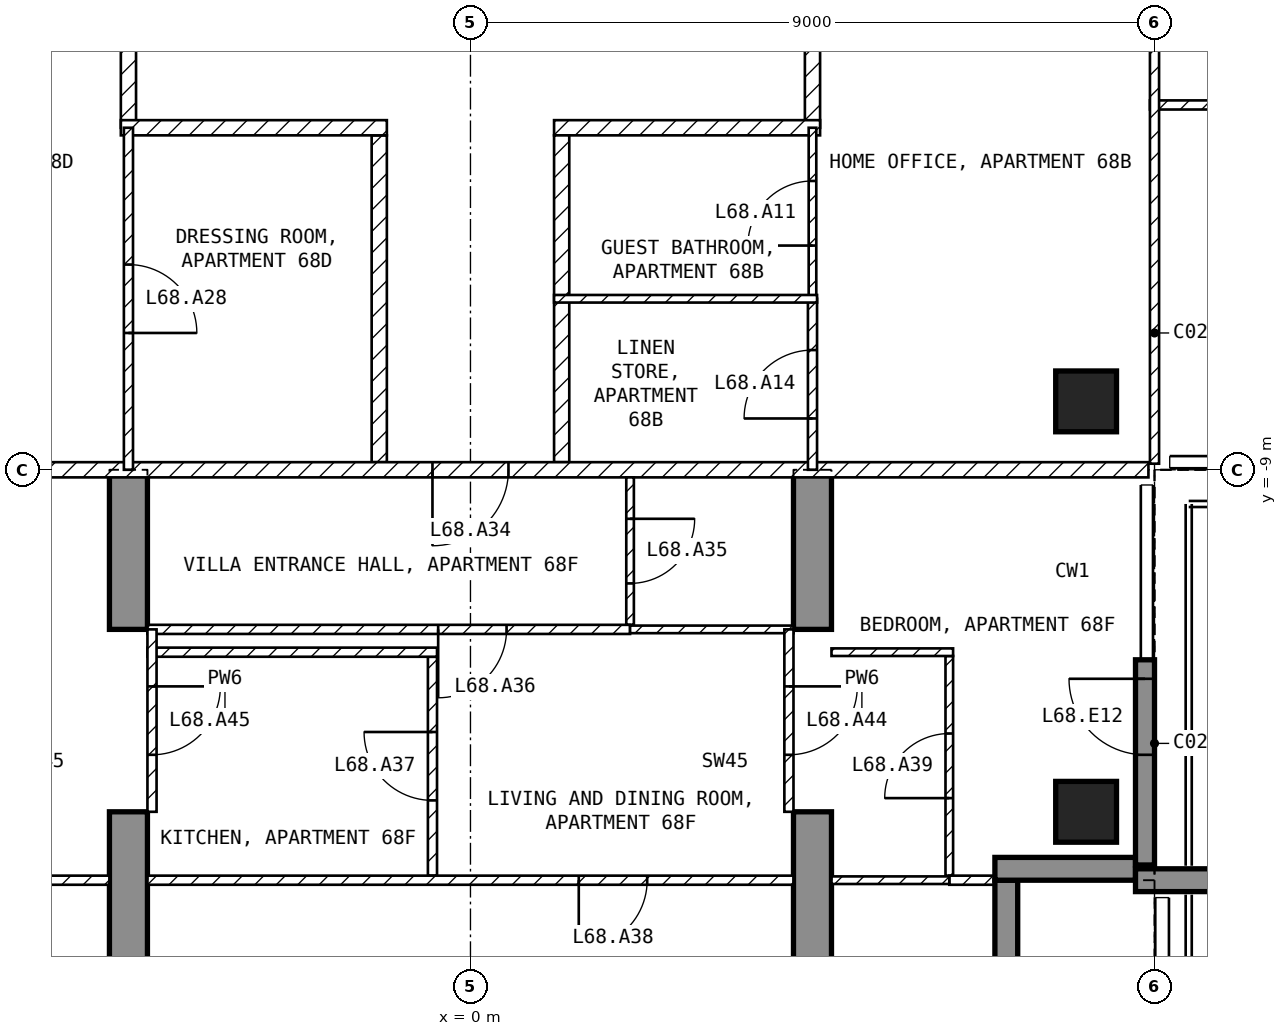
"""IFC4 building model, lengths in metres.
Left out: names, types, materials, properties, quantities, classifications, styles, units other than length and angle.
Written with IfcOpenShell. Run it as: python <this file> out.ifc"""

import sys

from ifc_helpers import new_model, si_unit, direction, frame, frame_2d, origin, origin_2d, place, context, subcontext, project, spatial, polyline, rectangle, outline, extrude, element, fill, save


model = new_model("IFC4")
c1 = context("Model", 3, precision=1e-05, world=origin(), true_north=direction((0.0, 1.0)))
c2 = subcontext(c1, "Body", "Model", "MODEL_VIEW")
j1 = project(units=[si_unit("LENGTHUNIT", "METRE"), si_unit("PLANEANGLEUNIT", "RADIAN")], contexts=[c1])
p1 = place(None, origin())
s1 = spatial("IfcSite", under=j1, at=p1, CompositionType="ELEMENT")
p2 = place(p1, origin())
s2 = spatial("IfcBuilding", under=s1, at=p2, CompositionType="ELEMENT")
p3 = place(p2, frame((0.0, 0.0, 267.5)))
s3 = spatial("IfcBuildingStorey", under=s2, at=p3, CompositionType="ELEMENT", Elevation=267.5)
for number, where, z_axis, x_axis in (
    (1, (8.1, -13.5, -0.25), (0.0, 0.0, 1.0), (1.0, 0.0, 0.0)),
    (2, (8.1, -8.1, -0.25), (0.0, 0.0, 1.0), (1.0, 0.0, 0.0)),
):
    element("IfcColumn", number, at=place(p3, frame(where, z_axis=z_axis, x_axis=x_axis)), inside=s3, PredefinedType="COLUMN", context=c2, shape_type="SweptSolid", body=[
        extrude(rectangle(XDim=0.8, YDim=0.8, at=origin_2d()), origin(), (0.0, 0.0, 1.0), 3.5),
    ])
for number, where, z_axis, x_axis in (
    (3, (-4.75, -16.7, -0.25), (1.0, 0.0, 0.0), (0.0, 1.0, 0.0)),
    (4, (4.25, -16.7, -0.25), (1.0, 0.0, 0.0), (0.0, 1.0, 0.0)),
):
    element("IfcWall", number, at=place(p3, frame(where, z_axis=z_axis, x_axis=x_axis)), inside=s3, PredefinedType="SHEAR", context=c2, shape_type="SweptSolid", body=[
        extrude(outline(polyline([(0.0, 0.0), (3.2, 0.0), (3.2, 2.65), (5.6, 2.65), (5.6, 0.0), (7.7, 0.0), (7.7, 3.5), (0.0, 3.5), (0.0, 0.0)])), origin(), (0.0, 0.0, 1.0), 0.5),
    ])
p4 = place(p3, frame((8.875, -14.2, 0.0), z_axis=(0.0, 0.0, 1.0), x_axis=(0.0, 1.0, 0.0)))
e5 = element("IfcWall", 5, at=p4, inside=s3, PredefinedType="SOLIDWALL", context=c2, shape_type="SweptSolid", body=[
    extrude(rectangle(XDim=2.7, YDim=0.25, at=frame_2d((1.35, 0.0))), origin(), (0.0, 0.0, 1.0), 3.25),
])
p5 = place(p4, frame((1.45, 0.0, 0.0)))
e6 = element("IfcOpeningElement", 6, at=p5, cuts=e5, PredefinedType="OPENING", context=c2, shape_type="SweptSolid", body=[
    extrude(rectangle(XDim=1.0, YDim=2.4, at=frame_2d((0.5, 1.2))), frame((0.0, 0.135, 0.0), z_axis=(0.0, -1.0, 0.0), x_axis=(1.0, 0.0, 0.0)), (0.0, 0.0, 1.0), 0.27),
])
p6 = place(p3, frame((7.05, -16.2, 0.0), z_axis=(0.0, 0.0, 1.0), x_axis=(0.0, 1.0, 0.0)))
e7 = element("IfcWall", 7, at=p6, inside=s3, PredefinedType="SOLIDWALL", context=c2, shape_type="SweptSolid", body=[
    extrude(rectangle(XDim=1.8, YDim=0.3, at=frame_2d((0.9, 0.0))), origin(), (0.0, 0.0, 1.0), 3.25),
])
p7 = place(p3, frame((6.9, -14.25, 0.0), z_axis=(0.0, 0.0, 1.0), x_axis=(1.0, 0.0, 0.0)))
e8 = element("IfcWall", 8, at=p7, inside=s3, PredefinedType="SOLIDWALL", context=c2, shape_type="SweptSolid", body=[
    extrude(rectangle(XDim=1.85, YDim=0.3, at=frame_2d((0.925, 0.0))), origin(), (0.0, 0.0, 1.0), 3.25),
])
p8 = place(p3, frame((8.75, -14.4, 0.0), z_axis=(0.0, 0.0, 1.0), x_axis=(1.0, 0.0, 0.0)))
e9 = element("IfcWall", 9, at=p8, inside=s3, PredefinedType="SOLIDWALL", context=c2, shape_type="SweptSolid", body=[
    extrude(rectangle(XDim=2.95, YDim=0.3, at=frame_2d((1.475, 0.0))), origin(), (0.0, 0.0, 1.0), 3.25),
])
p9 = place(p3, frame((4.5, -1.3, 0.0), z_axis=(0.0, 0.0, 1.0), x_axis=(0.0, -1.0, 0.0)))
e10 = element("IfcWall", 10, at=p9, inside=s3, PredefinedType="PARTITIONING", context=c2, shape_type="SweptSolid", body=[
    extrude(rectangle(XDim=3.2, YDim=0.2, at=frame_2d((1.6, 0.0))), origin(), (0.0, 0.0, 1.0), 3.25),
])
p10 = place(p3, frame((4.6, -4.5, 0.0), z_axis=(0.0, 0.0, 1.0), x_axis=(-1.0, 0.0, 0.0)))
e11 = element("IfcWall", 11, at=p10, inside=s3, PredefinedType="PARTITIONING", context=c2, shape_type="SweptSolid", body=[
    extrude(rectangle(XDim=3.5, YDim=0.2, at=frame_2d((1.75, 0.0))), origin(), (0.0, 0.0, 1.0), 3.25),
])
p11 = place(p3, frame((1.2, -4.6, 0.0), z_axis=(0.0, 0.0, 1.0), x_axis=(0.0, -1.0, 0.0)))
e12 = element("IfcWall", 12, at=p11, inside=s3, PredefinedType="PARTITIONING", context=c2, shape_type="SweptSolid", body=[
    extrude(rectangle(XDim=4.3, YDim=0.2, at=frame_2d((2.15, 0.0))), origin(), (0.0, 0.0, 1.0), 3.25),
])
p12 = place(p3, frame((-4.5, -4.5, 0.0), z_axis=(0.0, 0.0, 1.0), x_axis=(0.0, 1.0, 0.0)))
e13 = element("IfcWall", 13, at=p12, inside=s3, PredefinedType="PARTITIONING", context=c2, shape_type="SweptSolid", body=[
    extrude(rectangle(XDim=3.2, YDim=0.2, at=frame_2d((1.6, 0.0))), origin(), (0.0, 0.0, 1.0), 3.25),
])
p13 = place(p3, frame((-1.2, -8.9, 0.0), z_axis=(0.0, 0.0, 1.0), x_axis=(0.0, 1.0, 0.0)))
e14 = element("IfcWall", 14, at=p13, inside=s3, PredefinedType="PARTITIONING", context=c2, shape_type="SweptSolid", body=[
    extrude(rectangle(XDim=4.3, YDim=0.2, at=frame_2d((2.15, 0.0))), origin(), (0.0, 0.0, 1.0), 3.25),
])
p14 = place(p3, frame((-1.1, -4.5, 0.0), z_axis=(0.0, 0.0, 1.0), x_axis=(-1.0, 0.0, 0.0)))
e15 = element("IfcWall", 15, at=p14, inside=s3, PredefinedType="PARTITIONING", context=c2, shape_type="SweptSolid", body=[
    extrude(rectangle(XDim=3.5, YDim=0.2, at=frame_2d((1.75, 0.0))), origin(), (0.0, 0.0, 1.0), 3.25),
])
p15 = place(p3, frame((8.92, -9.0, 0.0), z_axis=(0.0, 0.0, 1.0), x_axis=(-1.0, 0.0, 0.0)))
e16 = element("IfcWall", 16, at=p15, inside=s3, PredefinedType="PARTITIONING", context=c2, shape_type="SweptSolid", body=[
    extrude(rectangle(XDim=17.84, YDim=0.2, at=frame_2d((8.92, 0.0))), origin(), (0.0, 0.0, 1.0), 3.25),
])
p16 = place(p15, frame((8.42, 0.0, 0.0)))
e17 = element("IfcOpeningElement", 17, at=p16, cuts=e16, PredefinedType="OPENING", context=c2, shape_type="SweptSolid", body=[
    extrude(rectangle(XDim=1.0, YDim=2.1, at=frame_2d((0.5, 1.05))), frame((0.0, 0.11, 0.0), z_axis=(0.0, -1.0, 0.0), x_axis=(1.0, 0.0, 0.0)), (0.0, 0.0, 1.0), 0.22),
])
p17 = place(p3, frame((15.6, -4.2, 0.0), z_axis=(0.0, 0.0, 1.0), x_axis=(-1.0, 0.0, 0.0)))
e18 = element("IfcWall", 18, at=p17, inside=s3, PredefinedType="PARTITIONING", context=c2, shape_type="SweptSolid", body=[
    extrude(rectangle(XDim=6.66, YDim=0.12, at=frame_2d((3.33, 0.0))), origin(), (0.0, 0.0, 1.0), 3.25),
])
p18 = place(p17, frame((4.5, 0.0, 0.0)))
e19 = element("IfcOpeningElement", 19, at=p18, cuts=e18, PredefinedType="OPENING", context=c2, shape_type="SweptSolid", body=[
    extrude(rectangle(XDim=0.9, YDim=2.1, at=frame_2d((0.45, 1.05))), frame((0.0, 0.07, 0.0), z_axis=(0.0, -1.0, 0.0), x_axis=(1.0, 0.0, 0.0)), (0.0, 0.0, 1.0), 0.14),
])
p19 = place(p3, frame((9.0, -8.92, 0.0), z_axis=(0.0, 0.0, 1.0), x_axis=(0.0, 1.0, 0.0)))
e20 = element("IfcWall", 20, at=p19, inside=s3, PredefinedType="PARTITIONING", context=c2, shape_type="SweptSolid", body=[
    extrude(rectangle(XDim=7.62, YDim=0.12, at=frame_2d((3.81, 0.0))), origin(), (0.0, 0.0, 1.0), 3.25),
])
p20 = place(p19, frame((5.72, 0.0, 0.0)))
e21 = element("IfcOpeningElement", 21, at=p20, cuts=e20, PredefinedType="OPENING", context=c2, shape_type="SweptSolid", body=[
    extrude(rectangle(XDim=0.9, YDim=2.1, at=frame_2d((0.45, 1.05))), frame((0.0, 0.07, 0.0), z_axis=(0.0, -1.0, 0.0), x_axis=(1.0, 0.0, 0.0)), (0.0, 0.0, 1.0), 0.14),
])
p21 = place(p3, frame((4.5, -6.75, 0.0), z_axis=(0.0, 0.0, 1.0), x_axis=(0.0, 1.0, 0.0)))
e22 = element("IfcWall", 22, at=p21, inside=s3, PredefinedType="PARTITIONING", context=c2, shape_type="SweptSolid", body=[
    extrude(rectangle(XDim=2.25, YDim=0.1, at=frame_2d((1.125, 0.0))), origin(), (0.0, 0.0, 1.0), 3.25),
])
p22 = place(p21, frame((0.7, 0.0, 0.0)))
e23 = element("IfcOpeningElement", 23, at=p22, cuts=e22, PredefinedType="OPENING", context=c2, shape_type="SweptSolid", body=[
    extrude(rectangle(XDim=0.85, YDim=2.1, at=frame_2d((0.425, 1.05))), frame((0.0, 0.06, 0.0), z_axis=(0.0, -1.0, 0.0), x_axis=(1.0, 0.0, 0.0)), (0.0, 0.0, 1.0), 0.12),
])
p23 = place(p3, frame((4.5, -9.0, 0.0), z_axis=(0.0, 0.0, 1.0), x_axis=(0.0, 1.0, 0.0)))
e24 = element("IfcWall", 24, at=p23, inside=s3, PredefinedType="PARTITIONING", context=c2, shape_type="SweptSolid", body=[
    extrude(rectangle(XDim=2.25, YDim=0.12, at=frame_2d((1.125, 0.0))), origin(), (0.0, 0.0, 1.0), 3.25),
])
p24 = place(p23, frame((0.675, 0.0, 0.0)))
e25 = element("IfcOpeningElement", 25, at=p24, cuts=e24, PredefinedType="OPENING", context=c2, shape_type="SweptSolid", body=[
    extrude(rectangle(XDim=0.9, YDim=2.1, at=frame_2d((0.45, 1.05))), frame((0.0, 0.07, 0.0), z_axis=(0.0, -1.0, 0.0), x_axis=(1.0, 0.0, 0.0)), (0.0, 0.0, 1.0), 0.14),
])
p25 = place(p3, frame((4.56, -6.75, 0.0), z_axis=(0.0, 0.0, 1.0), x_axis=(-1.0, 0.0, 0.0)))
e26 = element("IfcWall", 26, at=p25, inside=s3, PredefinedType="PARTITIONING", context=c2, shape_type="SweptSolid", body=[
    extrude(rectangle(XDim=3.46, YDim=0.1, at=frame_2d((1.73, 0.0))), origin(), (0.0, 0.0, 1.0), 3.25),
])
p26 = place(p3, frame((-4.5, -4.5, 0.0), z_axis=(0.0, 0.0, 1.0), x_axis=(0.0, -1.0, 0.0)))
e27 = element("IfcWall", 27, at=p26, inside=s3, PredefinedType="PARTITIONING", context=c2, shape_type="SweptSolid", body=[
    extrude(rectangle(XDim=4.5, YDim=0.12, at=frame_2d((2.25, 0.0))), origin(), (0.0, 0.0, 1.0), 3.25),
])
p27 = place(p26, frame((1.8, 0.0, 0.0)))
e28 = element("IfcOpeningElement", 28, at=p27, cuts=e27, PredefinedType="OPENING", context=c2, shape_type="SweptSolid", body=[
    extrude(rectangle(XDim=0.9, YDim=2.1, at=frame_2d((0.45, 1.05))), frame((0.0, 0.07, 0.0), z_axis=(0.0, -1.0, 0.0), x_axis=(1.0, 0.0, 0.0)), (0.0, 0.0, 1.0), 0.14),
])
p28 = place(p3, frame((2.1, -9.1, 0.0), z_axis=(0.0, 0.0, 1.0), x_axis=(0.0, -1.0, 0.0)))
e29 = element("IfcWall", 29, at=p28, inside=s3, PredefinedType="PARTITIONING", context=c2, shape_type="SweptSolid", body=[
    extrude(rectangle(XDim=1.94, YDim=0.1, at=frame_2d((0.97, 0.0))), origin(), (0.0, 0.0, 1.0), 3.25),
])
p29 = place(p28, frame((0.545, 0.0, 0.0)))
e30 = element("IfcOpeningElement", 30, at=p29, cuts=e29, PredefinedType="OPENING", context=c2, shape_type="SweptSolid", body=[
    extrude(rectangle(XDim=0.85, YDim=2.1, at=frame_2d((0.425, 1.05))), frame((0.0, 0.06, 0.0), z_axis=(0.0, -1.0, 0.0), x_axis=(1.0, 0.0, 0.0)), (0.0, 0.0, 1.0), 0.12),
])
p30 = place(p3, frame((2.1, -11.1, 0.0), z_axis=(0.0, 0.0, 1.0), x_axis=(-1.0, 0.0, 0.0)))
e31 = element("IfcWall", 31, at=p30, inside=s3, PredefinedType="PARTITIONING", context=c2, shape_type="SweptSolid", body=[
    extrude(rectangle(XDim=6.35, YDim=0.12, at=frame_2d((3.175, 0.0))), origin(), (0.0, 0.0, 1.0), 3.25),
])
p31 = place(p30, frame((1.625, 0.0, 0.0)))
e32 = element("IfcOpeningElement", 32, at=p31, cuts=e31, PredefinedType="OPENING", context=c2, shape_type="SweptSolid", body=[
    extrude(rectangle(XDim=0.9, YDim=2.1, at=frame_2d((0.45, 1.05))), frame((0.0, 0.07, 0.0), z_axis=(0.0, -1.0, 0.0), x_axis=(1.0, 0.0, 0.0)), (0.0, 0.0, 1.0), 0.14),
])
p32 = place(p3, frame((4.25, -11.1, 0.0), z_axis=(0.0, 0.0, 1.0), x_axis=(-1.0, 0.0, 0.0)))
e33 = element("IfcWall", 33, at=p32, inside=s3, PredefinedType="PARTITIONING", context=c2, shape_type="SweptSolid", body=[
    extrude(rectangle(XDim=2.15, YDim=0.1, at=frame_2d((1.075, 0.0))), origin(), (0.0, 0.0, 1.0), 3.25),
])
p33 = place(p3, frame((-0.5, -14.34, 0.0), z_axis=(0.0, 0.0, 1.0), x_axis=(0.0, 1.0, 0.0)))
e34 = element("IfcWall", 34, at=p33, inside=s3, PredefinedType="PARTITIONING", context=c2, shape_type="SweptSolid", body=[
    extrude(rectangle(XDim=2.88, YDim=0.12, at=frame_2d((1.44, 0.0))), origin(), (0.0, 0.0, 1.0), 3.25),
])
p34 = place(p33, frame((0.99, 0.0, 0.0)))
e35 = element("IfcOpeningElement", 35, at=p34, cuts=e34, PredefinedType="OPENING", context=c2, shape_type="SweptSolid", body=[
    extrude(rectangle(XDim=0.9, YDim=2.1, at=frame_2d((0.45, 1.05))), frame((0.0, 0.07, 0.0), z_axis=(0.0, -1.0, 0.0), x_axis=(1.0, 0.0, 0.0)), (0.0, 0.0, 1.0), 0.14),
])
p35 = place(p3, frame((-0.44, -11.4, 0.0), z_axis=(0.0, 0.0, 1.0), x_axis=(-1.0, 0.0, 0.0)))
e36 = element("IfcWall", 36, at=p35, inside=s3, PredefinedType="PARTITIONING", context=c2, shape_type="SweptSolid", body=[
    extrude(rectangle(XDim=3.81, YDim=0.12, at=frame_2d((1.905, 0.0))), origin(), (0.0, 0.0, 1.0), 3.25),
])
p36 = place(p3, frame((4.25, -14.4, 0.0), z_axis=(0.0, 0.0, 1.0), x_axis=(-1.0, 0.0, 0.0)))
e37 = element("IfcWall", 37, at=p36, inside=s3, PredefinedType="PARTITIONING", context=c2, shape_type="SweptSolid", body=[
    extrude(rectangle(XDim=8.5, YDim=0.12, at=frame_2d((4.25, 0.0))), origin(), (0.0, 0.0, 1.0), 3.25),
])
p37 = place(p36, frame((1.925, 0.0, 0.0)))
e38 = element("IfcOpeningElement", 38, at=p37, cuts=e37, PredefinedType="OPENING", context=c2, shape_type="SweptSolid", body=[
    extrude(rectangle(XDim=0.9, YDim=2.1, at=frame_2d((0.45, 1.05))), frame((0.0, 0.07, 0.0), z_axis=(0.0, -1.0, 0.0), x_axis=(1.0, 0.0, 0.0)), (0.0, 0.0, 1.0), 0.14),
])
p38 = place(p3, frame((6.3, -14.34, 0.0), z_axis=(0.0, 0.0, 1.0), x_axis=(0.0, 1.0, 0.0)))
e39 = element("IfcWall", 39, at=p38, inside=s3, PredefinedType="PARTITIONING", context=c2, shape_type="SweptSolid", body=[
    extrude(rectangle(XDim=2.89, YDim=0.1, at=frame_2d((1.445, 0.0))), origin(), (0.0, 0.0, 1.0), 3.25),
])
p39 = place(p38, frame((1.02, 0.0, 0.0)))
e40 = element("IfcOpeningElement", 40, at=p39, cuts=e39, PredefinedType="OPENING", context=c2, shape_type="SweptSolid", body=[
    extrude(rectangle(XDim=0.85, YDim=2.1, at=frame_2d((0.425, 1.05))), frame((0.0, 0.06, 0.0), z_axis=(0.0, -1.0, 0.0), x_axis=(1.0, 0.0, 0.0)), (0.0, 0.0, 1.0), 0.12),
])
p40 = place(p3, frame((6.35, -11.4, 0.0), z_axis=(0.0, 0.0, 1.0), x_axis=(-1.0, 0.0, 0.0)))
e41 = element("IfcWall", 41, at=p40, inside=s3, PredefinedType="PARTITIONING", context=c2, shape_type="SweptSolid", body=[
    extrude(rectangle(XDim=1.6, YDim=0.1, at=frame_2d((0.8, 0.0))), origin(), (0.0, 0.0, 1.0), 3.25),
])
p41 = place(p3, frame((7.12, -14.4, 0.0), z_axis=(0.0, 0.0, 1.0), x_axis=(-1.0, 0.0, 0.0)))
e42 = element("IfcWall", 42, at=p41, inside=s3, PredefinedType="PARTITIONING", context=c2, shape_type="SweptSolid", body=[
    extrude(rectangle(XDim=0.82, YDim=0.12, at=frame_2d((0.41, 0.0))), origin(), (0.0, 0.0, 1.0), 3.25),
])
p42 = place(p3, frame((6.3, -14.4, 0.0), z_axis=(0.0, 0.0, 1.0), x_axis=(-1.0, 0.0, 0.0)))
e43 = element("IfcWall", 43, at=p42, inside=s3, PredefinedType="PARTITIONING", context=c2, shape_type="SweptSolid", body=[
    extrude(rectangle(XDim=1.55, YDim=0.1, at=frame_2d((0.775, 0.0))), origin(), (0.0, 0.0, 1.0), 3.25),
])
p43 = place(p3, frame((-4.75, -14.4, 0.0), z_axis=(0.0, 0.0, 1.0), x_axis=(-1.0, 0.0, 0.0)))
e44 = element("IfcWall", 44, at=p43, inside=s3, PredefinedType="PARTITIONING", context=c2, shape_type="SweptSolid", body=[
    extrude(rectangle(XDim=2.37, YDim=0.12, at=frame_2d((1.185, 0.0))), origin(), (0.0, 0.0, 1.0), 3.25),
])
p44 = place(p3, frame((4.19, -11.1, 0.0), z_axis=(0.0, 0.0, 1.0), x_axis=(0.0, -1.0, 0.0)))
e45 = element("IfcWall", 45, at=p44, inside=s3, PredefinedType="PARTITIONING", context=c2, shape_type="SweptSolid", body=[
    extrude(rectangle(XDim=2.4, YDim=0.12, at=frame_2d((1.2, 0.0))), origin(), (0.0, 0.0, 1.0), 2.4),
])
p45 = place(p44, frame((0.75, 0.0, 0.0)))
e46 = element("IfcOpeningElement", 46, at=p45, cuts=e45, PredefinedType="OPENING", context=c2, shape_type="SweptSolid", body=[
    extrude(rectangle(XDim=0.9, YDim=2.1, at=frame_2d((0.45, 1.05))), frame((0.0, 0.07, 0.0), z_axis=(0.0, -1.0, 0.0), x_axis=(1.0, 0.0, 0.0)), (0.0, 0.0, 1.0), 0.14),
])
p46 = place(p3, frame((-4.19, -11.1, 0.0), z_axis=(0.0, 0.0, 1.0), x_axis=(0.0, -1.0, 0.0)))
e47 = element("IfcWall", 47, at=p46, inside=s3, PredefinedType="PARTITIONING", context=c2, shape_type="SweptSolid", body=[
    extrude(rectangle(XDim=2.4, YDim=0.12, at=frame_2d((1.2, 0.0))), origin(), (0.0, 0.0, 1.0), 2.4),
])
p47 = place(p46, frame((0.75, 0.0, 0.0)))
e48 = element("IfcOpeningElement", 48, at=p47, cuts=e47, PredefinedType="OPENING", context=c2, shape_type="SweptSolid", body=[
    extrude(rectangle(XDim=0.9, YDim=2.1, at=frame_2d((0.45, 1.05))), frame((0.0, 0.07, 0.0), z_axis=(0.0, -1.0, 0.0), x_axis=(1.0, 0.0, 0.0)), (0.0, 0.0, 1.0), 0.14),
])
p48 = place(p5, origin())
e49 = element("IfcDoor", 49, at=p48, inside=s3, OperationType="SINGLE_SWING_RIGHT", PredefinedType="DOOR", context=c2, shape_type="SweptSolid", body=[
    extrude(rectangle(XDim=1.0, YDim=2.4, at=frame_2d((0.5, 1.2))), frame((0.0, 0.025, 0.0), z_axis=(0.0, -1.0, 0.0), x_axis=(1.0, 0.0, 0.0)), (0.0, 0.0, 1.0), 0.05),
])
fill(e6, e49)
p49 = place(p22, origin())
e50 = element("IfcDoor", 50, at=p49, inside=s3, OperationType="SINGLE_SWING_LEFT", PredefinedType="DOOR", context=c2, shape_type="SweptSolid", body=[
    extrude(rectangle(XDim=0.85, YDim=2.1, at=frame_2d((0.425, 1.05))), frame((0.0, 0.025, 0.0), z_axis=(0.0, -1.0, 0.0), x_axis=(1.0, 0.0, 0.0)), (0.0, 0.0, 1.0), 0.05),
])
fill(e23, e50)
p50 = place(p24, origin())
e51 = element("IfcDoor", 51, at=p50, inside=s3, OperationType="SINGLE_SWING_LEFT", PredefinedType="DOOR", context=c2, shape_type="SweptSolid", body=[
    extrude(rectangle(XDim=0.9, YDim=2.1, at=frame_2d((0.45, 1.05))), frame((0.0, 0.025, 0.0), z_axis=(0.0, -1.0, 0.0), x_axis=(1.0, 0.0, 0.0)), (0.0, 0.0, 1.0), 0.05),
])
fill(e25, e51)
p51 = place(p27, origin())
e52 = element("IfcDoor", 52, at=p51, inside=s3, OperationType="SINGLE_SWING_RIGHT", PredefinedType="DOOR", context=c2, shape_type="SweptSolid", body=[
    extrude(rectangle(XDim=0.9, YDim=2.1, at=frame_2d((0.45, 1.05))), frame((0.0, 0.025, 0.0), z_axis=(0.0, -1.0, 0.0), x_axis=(1.0, 0.0, 0.0)), (0.0, 0.0, 1.0), 0.05),
])
fill(e28, e52)
p52 = place(p16, origin())
e53 = element("IfcDoor", 53, at=p52, inside=s3, OperationType="SINGLE_SWING_RIGHT", PredefinedType="DOOR", context=c2, shape_type="SweptSolid", body=[
    extrude(rectangle(XDim=1.0, YDim=2.1, at=frame_2d((0.5, 1.05))), frame((0.0, 0.025, 0.0), z_axis=(0.0, -1.0, 0.0), x_axis=(1.0, 0.0, 0.0)), (0.0, 0.0, 1.0), 0.05),
])
fill(e17, e53)
p53 = place(p29, origin())
e54 = element("IfcDoor", 54, at=p53, inside=s3, OperationType="SINGLE_SWING_LEFT", PredefinedType="DOOR", context=c2, shape_type="SweptSolid", body=[
    extrude(rectangle(XDim=0.85, YDim=2.1, at=frame_2d((0.425, 1.05))), frame((0.0, 0.025, 0.0), z_axis=(0.0, -1.0, 0.0), x_axis=(1.0, 0.0, 0.0)), (0.0, 0.0, 1.0), 0.05),
])
fill(e30, e54)
p54 = place(p31, origin())
e55 = element("IfcDoor", 55, at=p54, inside=s3, OperationType="SINGLE_SWING_RIGHT", PredefinedType="DOOR", context=c2, shape_type="SweptSolid", body=[
    extrude(rectangle(XDim=0.9, YDim=2.1, at=frame_2d((0.45, 1.05))), frame((0.0, 0.025, 0.0), z_axis=(0.0, -1.0, 0.0), x_axis=(1.0, 0.0, 0.0)), (0.0, 0.0, 1.0), 0.05),
])
fill(e32, e55)
p55 = place(p34, origin())
e56 = element("IfcDoor", 56, at=p55, inside=s3, OperationType="SINGLE_SWING_RIGHT", PredefinedType="DOOR", context=c2, shape_type="SweptSolid", body=[
    extrude(rectangle(XDim=0.9, YDim=2.1, at=frame_2d((0.45, 1.05))), frame((0.0, 0.025, 0.0), z_axis=(0.0, -1.0, 0.0), x_axis=(1.0, 0.0, 0.0)), (0.0, 0.0, 1.0), 0.05),
])
fill(e35, e56)
p56 = place(p37, origin())
e57 = element("IfcDoor", 57, at=p56, inside=s3, OperationType="SINGLE_SWING_RIGHT", PredefinedType="DOOR", context=c2, shape_type="SweptSolid", body=[
    extrude(rectangle(XDim=0.9, YDim=2.1, at=frame_2d((0.45, 1.05))), frame((0.0, 0.025, 0.0), z_axis=(0.0, -1.0, 0.0), x_axis=(1.0, 0.0, 0.0)), (0.0, 0.0, 1.0), 0.05),
])
fill(e38, e57)
p57 = place(p39, origin())
e58 = element("IfcDoor", 58, at=p57, inside=s3, OperationType="SINGLE_SWING_LEFT", PredefinedType="DOOR", context=c2, shape_type="SweptSolid", body=[
    extrude(rectangle(XDim=0.85, YDim=2.1, at=frame_2d((0.425, 1.05))), frame((0.0, 0.025, 0.0), z_axis=(0.0, -1.0, 0.0), x_axis=(1.0, 0.0, 0.0)), (0.0, 0.0, 1.0), 0.05),
])
fill(e40, e58)
p58 = place(p45, origin())
e59 = element("IfcDoor", 59, at=p58, inside=s3, OperationType="SINGLE_SWING_LEFT", PredefinedType="DOOR", context=c2, shape_type="SweptSolid", body=[
    extrude(rectangle(XDim=0.9, YDim=2.1, at=frame_2d((0.45, 1.05))), frame((0.0, 0.025, 0.0), z_axis=(0.0, -1.0, 0.0), x_axis=(1.0, 0.0, 0.0)), (0.0, 0.0, 1.0), 0.05),
])
fill(e46, e59)
p59 = place(p47, origin())
e60 = element("IfcDoor", 60, at=p59, inside=s3, OperationType="SINGLE_SWING_LEFT", PredefinedType="DOOR", context=c2, shape_type="SweptSolid", body=[
    extrude(rectangle(XDim=0.9, YDim=2.1, at=frame_2d((0.45, 1.05))), frame((0.0, 0.025, 0.0), z_axis=(0.0, -1.0, 0.0), x_axis=(1.0, 0.0, 0.0)), (0.0, 0.0, 1.0), 0.05),
])
fill(e48, e60)
save(model, sys.argv[1])
